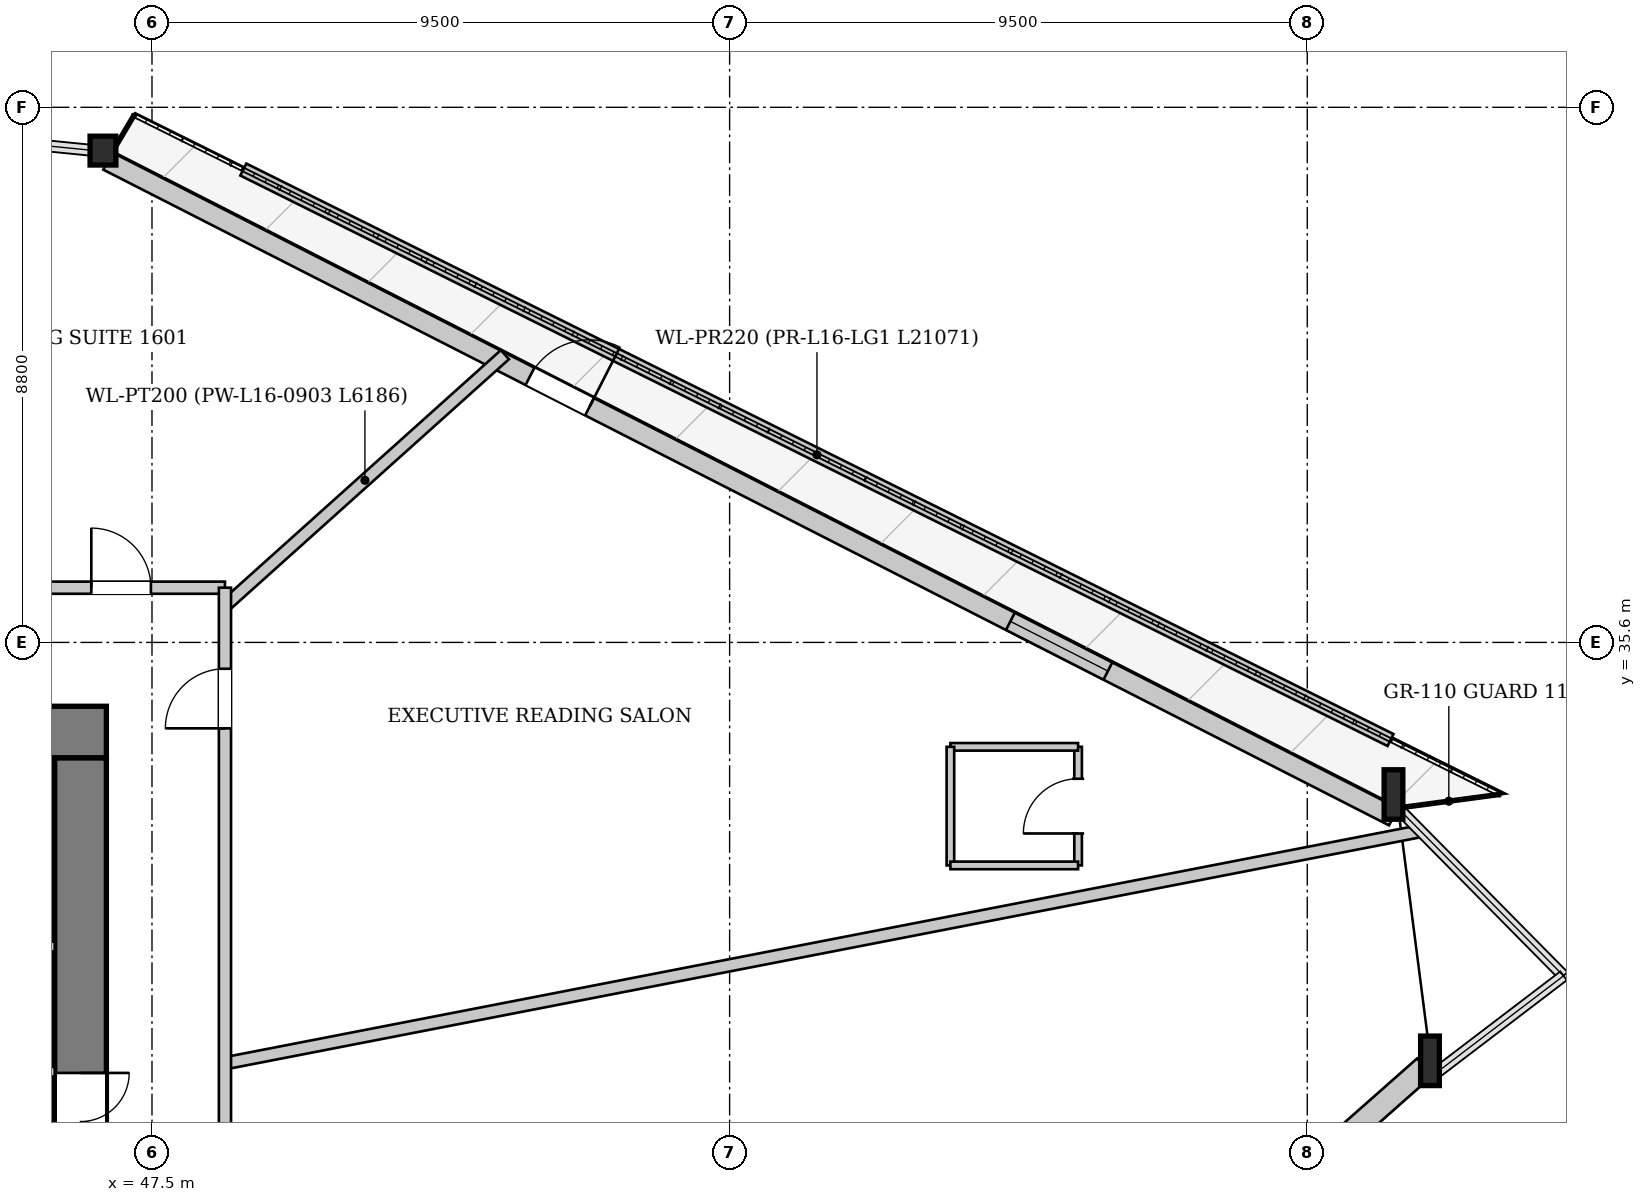
"""IFC4 building model, lengths in metres.
Left out: names, types, materials, properties, quantities, classifications, styles, units other than length and angle.
Written with IfcOpenShell. Run it as: python <this file> out.ifc"""

import sys

from ifc_helpers import new_model, si_unit, direction, frame, frame_2d, origin, origin_2d, place, context, subcontext, project, spatial, rectangle, i_section, extrude, source, transform, mapped, element, fill, save


model = new_model("IFC4")
c1 = context("Model", 3, precision=1e-05, world=origin(), true_north=direction((0.0, 1.0)))
c2 = subcontext(c1, "Body", "Model", "MODEL_VIEW")
j1 = project(units=[si_unit("LENGTHUNIT", "METRE"), si_unit("PLANEANGLEUNIT", "RADIAN")], contexts=[c1])
p1 = place(None, origin())
s1 = spatial("IfcSite", under=j1, at=p1, CompositionType="ELEMENT")
p2 = place(p1, origin())
s2 = spatial("IfcBuilding", under=s1, at=p2, CompositionType="ELEMENT")
p3 = place(p2, frame((0.0, 0.0, 64.8)))
s3 = spatial("IfcBuildingStorey", under=s2, at=p3, CompositionType="ELEMENT", Elevation=64.8)
m1 = source(origin(), c2, "Body", "SweptSolid", [
    extrude(i_section(OverallWidth=0.308, OverallDepth=0.814, WebThickness=0.021, FlangeThickness=0.04, at=origin_2d()), origin(), (0.0, 0.0, 1.0), 3.421),
])
p4 = place(p3, frame((68.558, 28.473, 0.0), z_axis=(-0.023261709787, 0.143780200062, 0.989336215312), x_axis=(-0.987163991357, -0.159709906294, 0.0)))
e1 = element("IfcColumn", 1, at=p4, inside=s3, PredefinedType="COLUMN", context=c2, shape_type="MappedRepresentation", body=[
    mapped(m1, transform((0.0, 0.0, 0.0), x_axis=(1.0, 0.0, 0.0), y_axis=(0.0, 1.0, 0.0), z_axis=(0.0, 0.0, 1.0), scale=1.0)),
])
m2 = source(origin(), c2, "Body", "SweptSolid", [
    extrude(i_section(OverallWidth=0.308, OverallDepth=0.814, WebThickness=0.021, FlangeThickness=0.04, at=origin_2d()), origin(), (0.0, 0.0, 1.0), 3.417),
])
p5 = place(p3, frame((67.99, 32.877, 0.0), z_axis=(-0.041868074629, 0.130105399145, 0.99061579305), x_axis=(-0.951925165949, -0.306330668449, 0.0)))
e2 = element("IfcColumn", 2, at=p5, inside=s3, PredefinedType="COLUMN", context=c2, shape_type="MappedRepresentation", body=[
    mapped(m2, transform((0.0, 0.0, 0.0), x_axis=(1.0, 0.0, 0.0), y_axis=(0.0, 1.0, 0.0), z_axis=(0.0, 0.0, 1.0), scale=1.0)),
])
m3 = source(origin(), c2, "Body", "SweptSolid", [
    extrude(i_section(OverallWidth=0.424, OverallDepth=0.474, WebThickness=0.043, FlangeThickness=0.068, at=origin_2d()), origin(), (0.0, 0.0, 1.0), 3.399),
])
p6 = place(p3, frame((46.844, 43.66, 0.0), z_axis=(-0.088495926026, 0.01659298613, 0.995938323335), x_axis=(-0.18428853505, -0.982872186934, 0.0)))
e3 = element("IfcColumn", 3, at=p6, inside=s3, PredefinedType="COLUMN", context=c2, shape_type="MappedRepresentation", body=[
    mapped(m3, transform((0.0, 0.0, 0.0), x_axis=(1.0, 0.0, 0.0), y_axis=(0.0, 1.0, 0.0), z_axis=(0.0, 0.0, 1.0), scale=1.0)),
])
p7 = place(p3, frame((46.771, 43.517, 0.0), z_axis=(0.0, 0.0, 1.0), x_axis=(0.890856769482, -0.454284290141, 0.0)))
e4 = element("IfcWall", 4, at=p7, inside=s3, PredefinedType="SOLIDWALL", context=c2, shape_type="SweptSolid", body=[
    extrude(rectangle(XDim=23.736, YDim=0.32, at=frame_2d((11.868, 0.0))), origin(), (0.0, 0.0, 1.0), 2.592),
])
p8 = place(p7, frame((7.796, 0.0, 0.0)))
e5 = element("IfcOpeningElement", 5, at=p8, cuts=e4, PredefinedType="OPENING", context=c2, shape_type="SweptSolid", body=[
    extrude(rectangle(XDim=1.1, YDim=2.3, at=frame_2d((0.55, 1.15))), frame((0.0, 0.17, 0.0), z_axis=(0.0, -1.0, 0.0), x_axis=(1.0, 0.0, 0.0)), (0.0, 0.0, 1.0), 0.34),
])
p9 = place(p7, frame((16.665, 0.0, 0.272)))
e6 = element("IfcOpeningElement", 6, at=p9, cuts=e4, PredefinedType="OPENING", context=c2, shape_type="SweptSolid", body=[
    extrude(rectangle(XDim=1.8, YDim=2.2, at=frame_2d((0.9, 1.1))), frame((0.0, 0.17, 0.0), z_axis=(0.0, -1.0, 0.0), x_axis=(1.0, 0.0, 0.0)), (0.0, 0.0, 1.0), 0.34),
])
p10 = place(p3, frame((68.432, 28.615, 0.0), z_axis=(0.0, 0.0, 1.0), x_axis=(-0.749537297232, -0.661962113763, 0.0)))
e7 = element("IfcWall", 7, at=p10, inside=s3, PredefinedType="SOLIDWALL", context=c2, shape_type="SweptSolid", body=[
    extrude(rectangle(XDim=24.351, YDim=0.38, at=frame_2d((12.176, 0.0))), origin(), (0.0, 0.0, 1.0), 2.592),
])
p11 = place(p10, frame((5.718, 0.0, 0.222)))
e8 = element("IfcOpeningElement", 8, at=p11, cuts=e7, PredefinedType="OPENING", context=c2, shape_type="SweptSolid", body=[
    extrude(rectangle(XDim=2.2, YDim=2.25, at=frame_2d((1.1, 1.125))), frame((0.0, 0.2, 0.0), z_axis=(0.0, -1.0, 0.0), x_axis=(1.0, 0.0, 0.0)), (0.0, 0.0, 1.0), 0.4),
])
p12 = place(p10, frame((16.233, 0.0, 0.222)))
e9 = element("IfcOpeningElement", 9, at=p12, cuts=e7, PredefinedType="OPENING", context=c2, shape_type="SweptSolid", body=[
    extrude(rectangle(XDim=2.2, YDim=2.25, at=frame_2d((1.1, 1.125))), frame((0.0, 0.2, 0.0), z_axis=(0.0, -1.0, 0.0), x_axis=(1.0, 0.0, 0.0)), (0.0, 0.0, 1.0), 0.4),
])
p13 = place(p3, frame((67.87, 33.994, 0.0), z_axis=(0.0, 0.0, 1.0), x_axis=(-0.895402951346, 0.445256729002, 0.0)))
e10 = element("IfcWall", 10, at=p13, inside=s3, PredefinedType="PARAPET", context=c2, shape_type="SweptSolid", body=[
    extrude(rectangle(XDim=21.071, YDim=0.22, at=frame_2d((10.536, 0.0))), origin(), (0.0, 0.0, 1.0), 0.3),
])
p14 = place(p3, frame((29.25, 34.125, 0.0), z_axis=(0.0, 0.0, 1.0), x_axis=(1.0, 0.0, 0.0)))
e11 = element("IfcWall", 11, at=p14, inside=s3, PredefinedType="SHEAR", context=c2, shape_type="SweptSolid", body=[
    extrude(rectangle(XDim=17.5, YDim=0.85, at=frame_2d((8.75, 0.0))), origin(), (0.0, 0.0, 1.0), 3.3),
])
p15 = place(p14, frame((1.85, 0.0, 0.0)))
e12 = element("IfcOpeningElement", 12, at=p15, cuts=e11, PredefinedType="OPENING", context=c2, shape_type="SweptSolid", body=[
    extrude(rectangle(XDim=0.95, YDim=2.1, at=frame_2d((0.475, 1.05))), frame((0.0, 0.435, 0.0), z_axis=(0.0, -1.0, 0.0), x_axis=(1.0, 0.0, 0.0)), (0.0, 0.0, 1.0), 0.87),
])
p16 = place(p14, frame((4.23, 0.0, 0.0)))
e13 = element("IfcOpeningElement", 13, at=p16, cuts=e11, PredefinedType="OPENING", context=c2, shape_type="SweptSolid", body=[
    extrude(rectangle(XDim=1.32, YDim=2.2, at=frame_2d((0.66, 1.1))), frame((0.0, 0.435, 0.0), z_axis=(0.0, -1.0, 0.0), x_axis=(1.0, 0.0, 0.0)), (0.0, 0.0, 1.0), 0.87),
])
p17 = place(p14, frame((15.3, 0.0, 0.0)))
e14 = element("IfcOpeningElement", 14, at=p17, cuts=e11, PredefinedType="OPENING", context=c2, shape_type="SweptSolid", body=[
    extrude(rectangle(XDim=0.95, YDim=2.1, at=frame_2d((0.475, 1.05))), frame((0.0, 0.435, 0.0), z_axis=(0.0, -1.0, 0.0), x_axis=(1.0, 0.0, 0.0)), (0.0, 0.0, 1.0), 0.87),
])
p18 = place(p3, frame((46.325, 33.7, 0.0), z_axis=(0.0, 0.0, 1.0), x_axis=(0.0, -1.0, 0.0)))
e15 = element("IfcWall", 15, at=p18, inside=s3, PredefinedType="SHEAR", context=c2, shape_type="SweptSolid", body=[
    extrude(rectangle(XDim=14.2, YDim=0.85, at=frame_2d((7.1, 0.0))), origin(), (0.0, 0.0, 1.0), 3.3),
])
p19 = place(p18, frame((5.18, 0.0, 0.0)))
e16 = element("IfcOpeningElement", 16, at=p19, cuts=e15, PredefinedType="OPENING", context=c2, shape_type="SweptSolid", body=[
    extrude(rectangle(XDim=1.6, YDim=2.2, at=frame_2d((0.8, 1.1))), frame((0.0, 0.435, 0.0), z_axis=(0.0, -1.0, 0.0), x_axis=(1.0, 0.0, 0.0)), (0.0, 0.0, 1.0), 0.87),
])
p20 = place(p3, frame((33.28, 28.54, 0.0), z_axis=(0.0, 0.0, 1.0), x_axis=(1.0, 0.0, 0.0)))
e17 = element("IfcWall", 17, at=p20, inside=s3, PredefinedType="PARTITIONING", context=c2, shape_type="SweptSolid", body=[
    extrude(rectangle(XDim=12.62, YDim=0.16, at=frame_2d((6.31, 0.0))), origin(), (0.0, 0.0, 1.0), 3.3),
])
p21 = place(p3, frame((40.72, 30.6, 0.0), z_axis=(0.0, 0.0, 1.0), x_axis=(1.0, 0.0, 0.0)))
e18 = element("IfcWall", 18, at=p21, inside=s3, PredefinedType="PARTITIONING", context=c2, shape_type="SweptSolid", body=[
    extrude(rectangle(XDim=5.18, YDim=0.16, at=frame_2d((2.59, 0.0))), origin(), (0.0, 0.0, 1.0), 3.3),
])
p22 = place(p3, frame((48.7, 36.201, 0.0), z_axis=(0.0, 0.0, 1.0), x_axis=(0.744315723631, 0.667827899653, 0.0)))
e19 = element("IfcWall", 19, at=p22, inside=s3, PredefinedType="PARTITIONING", context=c2, shape_type="SweptSolid", body=[
    extrude(rectangle(XDim=6.186, YDim=0.2, at=frame_2d((3.093, 0.0))), origin(), (0.0, 0.0, 1.0), 3.3),
])
p23 = place(p3, frame((48.7, 28.678, 0.0), z_axis=(0.0, 0.0, 1.0), x_axis=(0.981655464167, 0.190663446082, 0.0)))
e20 = element("IfcWall", 20, at=p23, inside=s3, PredefinedType="PARTITIONING", context=c2, shape_type="SweptSolid", body=[
    extrude(rectangle(XDim=19.996, YDim=0.2, at=frame_2d((9.998, 0.0))), origin(), (0.0, 0.0, 1.0), 3.3),
])
p24 = place(p3, frame((62.731, 31.933, 0.0), z_axis=(0.0, 0.0, 1.0), x_axis=(0.0, 1.0, 0.0)))
e21 = element("IfcWall", 21, at=p24, inside=s3, PredefinedType="PARTITIONING", context=c2, shape_type="SweptSolid", body=[
    extrude(rectangle(XDim=1.95, YDim=0.125, at=frame_2d((0.975, 0.0))), origin(), (0.0, 0.0, 1.0), 3.3),
])
p25 = place(p24, frame((0.525, 0.0, 0.0)))
e22 = element("IfcOpeningElement", 22, at=p25, cuts=e21, PredefinedType="OPENING", context=c2, shape_type="SweptSolid", body=[
    extrude(rectangle(XDim=0.9, YDim=2.1, at=frame_2d((0.45, 1.05))), frame((0.0, 0.073, 0.0), z_axis=(0.0, -1.0, 0.0), x_axis=(1.0, 0.0, 0.0)), (0.0, 0.0, 1.0), 0.145),
])
p26 = place(p3, frame((62.731, 33.883, 0.0), z_axis=(0.0, 0.0, 1.0), x_axis=(-1.0, 0.0, 0.0)))
e23 = element("IfcWall", 23, at=p26, inside=s3, PredefinedType="PARTITIONING", context=c2, shape_type="SweptSolid", body=[
    extrude(rectangle(XDim=2.1, YDim=0.125, at=frame_2d((1.05, 0.0))), origin(), (0.0, 0.0, 1.0), 3.3),
])
p27 = place(p3, frame((60.631, 33.883, 0.0), z_axis=(0.0, 0.0, 1.0), x_axis=(0.0, -1.0, 0.0)))
e24 = element("IfcWall", 24, at=p27, inside=s3, PredefinedType="PARTITIONING", context=c2, shape_type="SweptSolid", body=[
    extrude(rectangle(XDim=1.95, YDim=0.125, at=frame_2d((0.975, 0.0))), origin(), (0.0, 0.0, 1.0), 3.3),
])
p28 = place(p3, frame((60.631, 31.933, 0.0), z_axis=(0.0, 0.0, 1.0), x_axis=(1.0, 0.0, 0.0)))
e25 = element("IfcWall", 25, at=p28, inside=s3, PredefinedType="PARTITIONING", context=c2, shape_type="SweptSolid", body=[
    extrude(rectangle(XDim=2.1, YDim=0.125, at=frame_2d((1.05, 0.0))), origin(), (0.0, 0.0, 1.0), 2.795),
])
p29 = place(p3, frame((27.3, 36.5, 0.0), z_axis=(0.0, 0.0, 1.0), x_axis=(1.0, 0.0, 0.0)))
e26 = element("IfcWall", 26, at=p29, inside=s3, PredefinedType="PARTITIONING", context=c2, shape_type="SweptSolid", body=[
    extrude(rectangle(XDim=21.4, YDim=0.2, at=frame_2d((10.7, 0.0))), origin(), (0.0, 0.0, 1.0), 3.3),
])
p30 = place(p29, frame((19.202, 0.0, 0.0)))
e27 = element("IfcOpeningElement", 27, at=p30, cuts=e26, PredefinedType="OPENING", context=c2, shape_type="SweptSolid", body=[
    extrude(rectangle(XDim=0.98, YDim=2.15, at=frame_2d((0.49, 1.075))), frame((0.0, 0.11, 0.0), z_axis=(0.0, -1.0, 0.0), x_axis=(1.0, 0.0, 0.0)), (0.0, 0.0, 1.0), 0.22),
])
p31 = place(p29, frame((7.435, 0.0, 0.0)))
e28 = element("IfcOpeningElement", 28, at=p31, cuts=e26, PredefinedType="OPENING", context=c2, shape_type="SweptSolid", body=[
    extrude(rectangle(XDim=0.98, YDim=2.15, at=frame_2d((0.49, 1.075))), frame((0.0, 0.11, 0.0), z_axis=(0.0, -1.0, 0.0), x_axis=(1.0, 0.0, 0.0)), (0.0, 0.0, 1.0), 0.22),
])
p32 = place(p29, frame((0.3, 0.0, 0.0)))
e29 = element("IfcOpeningElement", 29, at=p32, cuts=e26, PredefinedType="OPENING", context=c2, shape_type="SweptSolid", body=[
    extrude(rectangle(XDim=0.98, YDim=2.15, at=frame_2d((0.49, 1.075))), frame((0.0, 0.11, 0.0), z_axis=(0.0, -1.0, 0.0), x_axis=(1.0, 0.0, 0.0)), (0.0, 0.0, 1.0), 0.22),
])
p33 = place(p3, frame((48.7, 16.7, 0.0), z_axis=(0.0, 0.0, 1.0), x_axis=(0.0, 1.0, 0.0)))
e30 = element("IfcWall", 30, at=p33, inside=s3, PredefinedType="PARTITIONING", context=c2, shape_type="SweptSolid", body=[
    extrude(rectangle(XDim=19.8, YDim=0.2, at=frame_2d((9.9, 0.0))), origin(), (0.0, 0.0, 1.0), 3.3),
])
p34 = place(p33, frame((6.752, 0.0, 0.0)))
e31 = element("IfcOpeningElement", 31, at=p34, cuts=e30, PredefinedType="OPENING", context=c2, shape_type="SweptSolid", body=[
    extrude(rectangle(XDim=0.98, YDim=2.15, at=frame_2d((0.49, 1.075))), frame((0.0, 0.11, 0.0), z_axis=(0.0, -1.0, 0.0), x_axis=(1.0, 0.0, 0.0)), (0.0, 0.0, 1.0), 0.22),
])
p35 = place(p33, frame((17.487, 0.0, 0.0)))
e32 = element("IfcOpeningElement", 32, at=p35, cuts=e30, PredefinedType="OPENING", context=c2, shape_type="SweptSolid", body=[
    extrude(rectangle(XDim=0.98, YDim=2.15, at=frame_2d((0.49, 1.075))), frame((0.0, 0.11, 0.0), z_axis=(0.0, -1.0, 0.0), x_axis=(1.0, 0.0, 0.0)), (0.0, 0.0, 1.0), 0.22),
])
m4 = source(origin(), c2, "Body", "SweptSolid", [
    extrude(rectangle(XDim=1.1, YDim=2.3, at=frame_2d((0.55, 1.15))), frame((0.0, 0.025, 0.0), z_axis=(0.0, -1.0, 0.0), x_axis=(1.0, 0.0, 0.0)), (0.0, 0.0, 1.0), 0.05),
])
p36 = place(p8, origin())
e33 = element("IfcDoor", 33, at=p36, inside=s3, OperationType="SINGLE_SWING_RIGHT", PredefinedType="DOOR", context=c2, shape_type="MappedRepresentation", body=[
    mapped(m4, transform((0.0, 0.0, 0.0), x_axis=(1.0, 0.0, 0.0), y_axis=(0.0, 1.0, 0.0), z_axis=(0.0, 0.0, 1.0), scale=1.0)),
])
fill(e5, e33)
m5 = source(origin(), c2, "Body", "SweptSolid", [
    extrude(rectangle(XDim=1.8, YDim=2.2, at=frame_2d((0.9, 1.1))), frame((0.0, 0.03, 0.0), z_axis=(0.0, -1.0, 0.0), x_axis=(1.0, 0.0, 0.0)), (0.0, 0.0, 1.0), 0.06),
])
p37 = place(p9, origin())
e34 = element("IfcWindow", 34, at=p37, inside=s3, PartitioningType="SINGLE_PANEL", PredefinedType="WINDOW", context=c2, shape_type="MappedRepresentation", body=[
    mapped(m5, transform((0.0, 0.0, 0.0), x_axis=(1.0, 0.0, 0.0), y_axis=(0.0, 1.0, 0.0), z_axis=(0.0, 0.0, 1.0), scale=1.0)),
])
fill(e6, e34)
m6 = source(origin(), c2, "Body", "SweptSolid", [
    extrude(rectangle(XDim=1.6, YDim=2.2, at=frame_2d((0.8, 1.1))), frame((0.0, 0.025, 0.0), z_axis=(0.0, -1.0, 0.0), x_axis=(1.0, 0.0, 0.0)), (0.0, 0.0, 1.0), 0.05),
])
p38 = place(p19, origin())
e35 = element("IfcDoor", 35, at=p38, inside=s3, OperationType="DOUBLE_DOOR_SINGLE_SWING", PredefinedType="DOOR", context=c2, shape_type="MappedRepresentation", body=[
    mapped(m6, transform((0.0, 0.0, 0.0), x_axis=(1.0, 0.0, 0.0), y_axis=(0.0, 1.0, 0.0), z_axis=(0.0, 0.0, 1.0), scale=1.0)),
])
fill(e16, e35)
m7 = source(origin(), c2, "Body", "SweptSolid", [
    extrude(rectangle(XDim=0.9, YDim=2.1, at=frame_2d((0.45, 1.05))), frame((0.0, 0.025, 0.0), z_axis=(0.0, -1.0, 0.0), x_axis=(1.0, 0.0, 0.0)), (0.0, 0.0, 1.0), 0.05),
])
p39 = place(p25, origin())
e36 = element("IfcDoor", 36, at=p39, inside=s3, OperationType="SINGLE_SWING_LEFT", PredefinedType="DOOR", context=c2, shape_type="MappedRepresentation", body=[
    mapped(m7, transform((0.0, 0.0, 0.0), x_axis=(1.0, 0.0, 0.0), y_axis=(0.0, 1.0, 0.0), z_axis=(0.0, 0.0, 1.0), scale=1.0)),
])
fill(e22, e36)
m8 = source(origin(), c2, "Body", "SweptSolid", [
    extrude(rectangle(XDim=0.98, YDim=2.15, at=frame_2d((0.49, 1.075))), frame((0.0, 0.025, 0.0), z_axis=(0.0, -1.0, 0.0), x_axis=(1.0, 0.0, 0.0)), (0.0, 0.0, 1.0), 0.05),
])
p40 = place(p30, origin())
e37 = element("IfcDoor", 37, at=p40, inside=s3, OperationType="SINGLE_SWING_LEFT", PredefinedType="DOOR", context=c2, shape_type="MappedRepresentation", body=[
    mapped(m8, transform((0.0, 0.0, 0.0), x_axis=(1.0, 0.0, 0.0), y_axis=(0.0, 1.0, 0.0), z_axis=(0.0, 0.0, 1.0), scale=1.0)),
])
fill(e27, e37)
p41 = place(p35, origin())
e38 = element("IfcDoor", 38, at=p41, inside=s3, OperationType="SINGLE_SWING_LEFT", PredefinedType="DOOR", context=c2, shape_type="MappedRepresentation", body=[
    mapped(m8, transform((0.0, 0.0, 0.0), x_axis=(1.0, 0.0, 0.0), y_axis=(0.0, 1.0, 0.0), z_axis=(0.0, 0.0, 1.0), scale=1.0)),
])
fill(e32, e38)
save(model, sys.argv[1])
